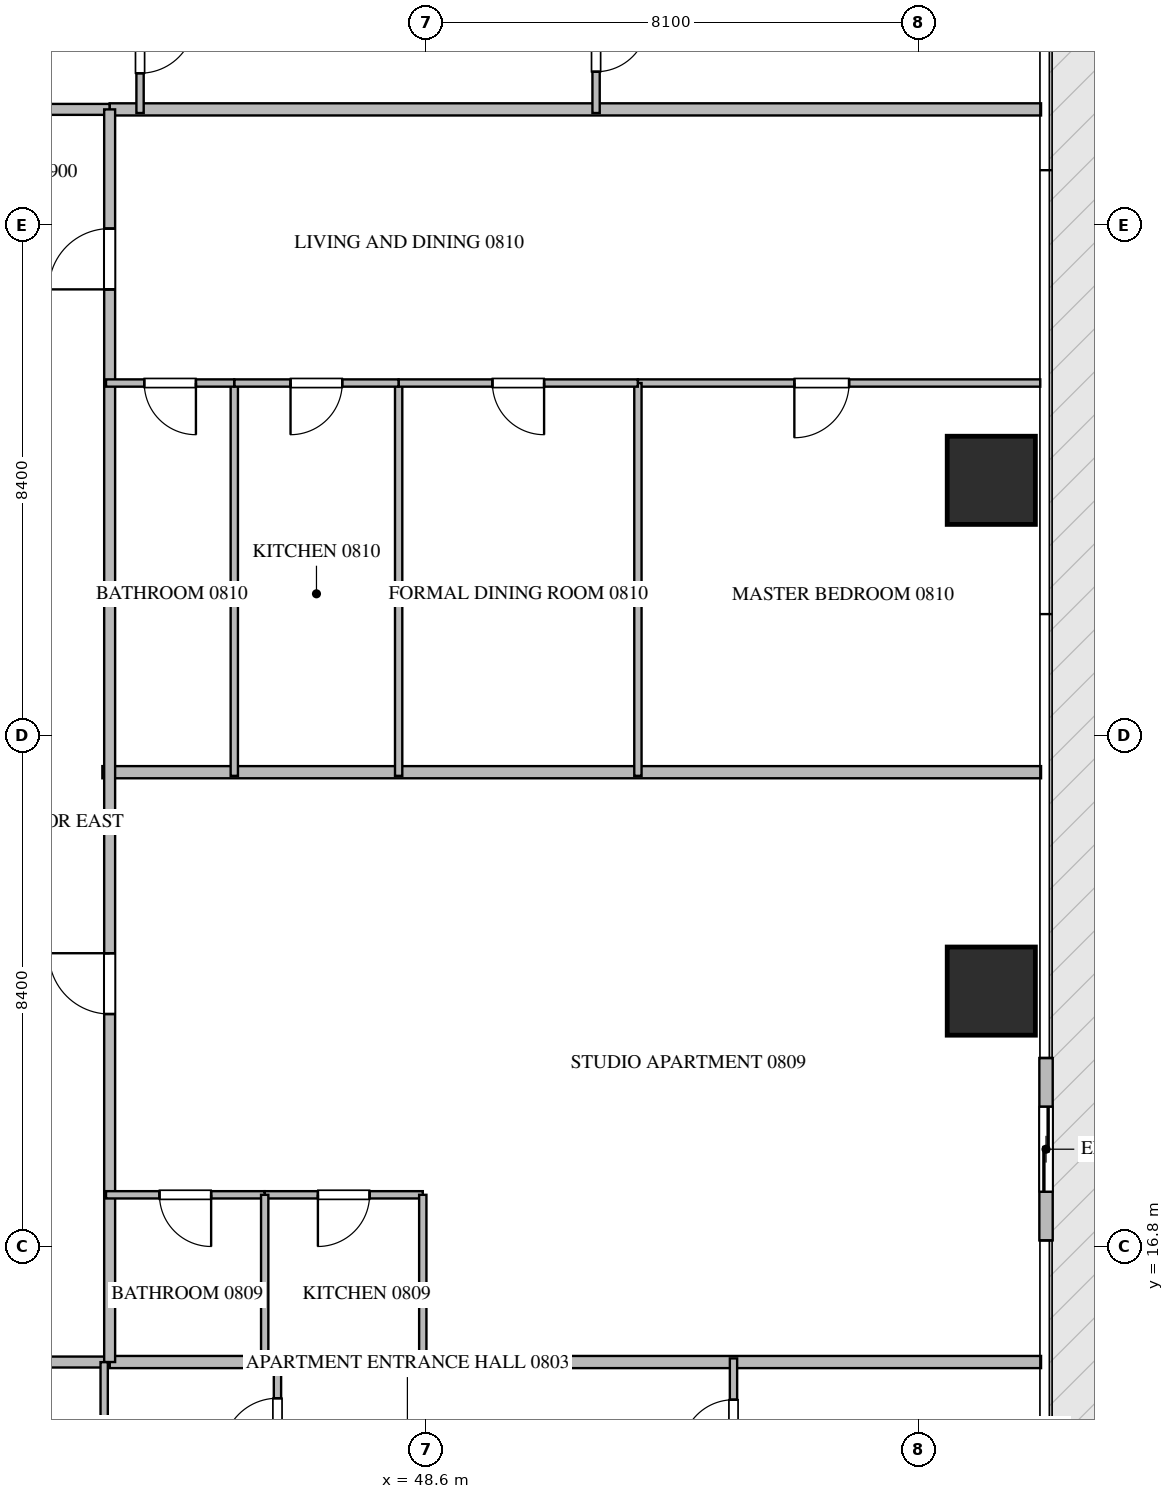
"""IFC4 building model, lengths in metres.
Left out: names, types, materials, properties, quantities, classifications, styles, units other than length and angle.
Written with IfcOpenShell. Run it as: python <this file> out.ifc"""

import sys

from ifc_helpers import new_model, si_unit, direction, frame, frame_2d, origin, origin_2d, place, context, subcontext, project, spatial, rectangle, extrude, source, transform, mapped, element, fill, save


model = new_model("IFC4")
c1 = context("Model", 3, precision=1e-05, world=origin(), true_north=direction((0.0, 1.0)))
c2 = subcontext(c1, "Body", "Model", "MODEL_VIEW")
j1 = project(units=[si_unit("LENGTHUNIT", "METRE"), si_unit("PLANEANGLEUNIT", "RADIAN")], contexts=[c1])
p1 = place(None, origin())
s1 = spatial("IfcSite", under=j1, at=p1, CompositionType="ELEMENT")
p2 = place(p1, origin())
s2 = spatial("IfcBuilding", under=s1, at=p2, CompositionType="ELEMENT")
p3 = place(p2, frame((0.0, 0.0, 37.95)))
s3 = spatial("IfcBuildingStorey", under=s2, at=p3, CompositionType="ELEMENT", Elevation=37.95)
m1 = source(origin(), c2, "Body", "SweptSolid", [
    extrude(rectangle(XDim=1.45, YDim=1.45, at=origin_2d()), origin(), (0.0, 0.0, 1.0), 3.75),
])
for number, where, z_axis, x_axis in (
    (1, (57.9, 21.0, -0.26), (0.0, 0.0, 1.0), (1.0, 0.0, 0.0)),
    (2, (57.9, 29.4, -0.26), (0.0, 0.0, 1.0), (1.0, 0.0, 0.0)),
):
    element("IfcColumn", number, at=place(p3, frame(where, z_axis=z_axis, x_axis=x_axis)), inside=s3, PredefinedType="COLUMN", context=c2, shape_type="MappedRepresentation", body=[
        mapped(m1, transform((0.0, 0.0, 0.0), scale=1.0)),
    ])
p4 = place(p3, frame((58.8, 16.9, 0.0), z_axis=(0.0, 0.0, 1.0), x_axis=(0.0, 1.0, 0.0)))
e3 = element("IfcWall", 3, at=p4, inside=s3, PredefinedType="ELEMENTEDWALL", context=c2, shape_type="SweptSolid", body=[
    extrude(rectangle(XDim=3.0, YDim=0.22, at=frame_2d((1.5, 0.0))), origin(), (0.0, 0.0, 1.0), 3.475),
])
p5 = place(p4, frame((0.8, 0.0, 0.0)))
e4 = element("IfcOpeningElement", 4, at=p5, cuts=e3, PredefinedType="OPENING", context=c2, shape_type="SweptSolid", body=[
    extrude(rectangle(XDim=1.4, YDim=2.25, at=frame_2d((0.7, 1.125))), frame((0.0, 0.12, 0.0), z_axis=(0.0, -1.0, 0.0), x_axis=(1.0, 0.0, 0.0)), (0.0, 0.0, 1.0), 0.24),
])
p6 = place(p3, frame((43.28, 24.6, 0.0), z_axis=(0.0, 0.0, 1.0), x_axis=(1.0, 0.0, 0.0)))
e5 = element("IfcWall", 5, at=p6, inside=s3, PredefinedType="PARTITIONING", context=c2, shape_type="SweptSolid", body=[
    extrude(rectangle(XDim=15.438, YDim=0.2, at=frame_2d((7.719, 0.0))), origin(), (0.0, 0.0, 1.0), 3.49),
])
for number, where, z_axis, x_axis in (
    (6, (43.4, 14.9, 0.0), (0.0, 0.0, 1.0), (1.0, 0.0, 0.0)),
    (7, (43.4, 35.5, 0.0), (0.0, 0.0, 1.0), (1.0, 0.0, 0.0)),
):
    element("IfcWall", number, at=place(p3, frame(where, z_axis=z_axis, x_axis=x_axis)), inside=s3, PredefinedType="PARTITIONING", context=c2, shape_type="SweptSolid", body=[
        extrude(rectangle(XDim=15.318, YDim=0.2, at=frame_2d((7.659, 0.0))), origin(), (0.0, 0.0, 1.0), 3.49),
    ])
p7 = place(p3, frame((21.402, 14.9, 0.0), z_axis=(0.0, 0.0, 1.0), x_axis=(1.0, 0.0, 0.0)))
e8 = element("IfcWall", 8, at=p7, inside=s3, PredefinedType="PARTITIONING", context=c2, shape_type="SweptSolid", body=[
    extrude(rectangle(XDim=21.996, YDim=0.18, at=frame_2d((10.998, 0.0))), origin(), (0.0, 0.0, 1.0), 3.49),
])
p8 = place(p7, frame((2.1, 0.0, 0.0)))
e9 = element("IfcOpeningElement", 9, at=p8, cuts=e8, PredefinedType="OPENING", context=c2, shape_type="SweptSolid", body=[
    extrude(rectangle(XDim=1.0, YDim=2.15, at=frame_2d((0.5, 1.075))), frame((0.0, 0.1, 0.0), z_axis=(0.0, -1.0, 0.0), x_axis=(1.0, 0.0, 0.0)), (0.0, 0.0, 1.0), 0.2),
])
p9 = place(p7, frame((14.109, 0.0, 0.0)))
e10 = element("IfcOpeningElement", 10, at=p9, cuts=e8, PredefinedType="OPENING", context=c2, shape_type="SweptSolid", body=[
    extrude(rectangle(XDim=1.0, YDim=2.15, at=frame_2d((0.5, 1.075))), frame((0.0, 0.1, 0.0), z_axis=(0.0, -1.0, 0.0), x_axis=(1.0, 0.0, 0.0)), (0.0, 0.0, 1.0), 0.2),
])
p10 = place(p7, frame((18.896, 0.0, 0.0)))
e11 = element("IfcOpeningElement", 11, at=p10, cuts=e8, PredefinedType="OPENING", context=c2, shape_type="SweptSolid", body=[
    extrude(rectangle(XDim=1.0, YDim=2.15, at=frame_2d((0.5, 1.075))), frame((0.0, 0.1, 0.0), z_axis=(0.0, -1.0, 0.0), x_axis=(1.0, 0.0, 0.0)), (0.0, 0.0, 1.0), 0.2),
])
p11 = place(p3, frame((21.402, 35.5, 0.0), z_axis=(0.0, 0.0, 1.0), x_axis=(1.0, 0.0, 0.0)))
e12 = element("IfcWall", 12, at=p11, inside=s3, PredefinedType="PARTITIONING", context=c2, shape_type="SweptSolid", body=[
    extrude(rectangle(XDim=21.996, YDim=0.18, at=frame_2d((10.998, 0.0))), origin(), (0.0, 0.0, 1.0), 3.49),
])
p12 = place(p11, frame((2.1, 0.0, 0.0)))
e13 = element("IfcOpeningElement", 13, at=p12, cuts=e12, PredefinedType="OPENING", context=c2, shape_type="SweptSolid", body=[
    extrude(rectangle(XDim=1.0, YDim=2.15, at=frame_2d((0.5, 1.075))), frame((0.0, 0.1, 0.0), z_axis=(0.0, -1.0, 0.0), x_axis=(1.0, 0.0, 0.0)), (0.0, 0.0, 1.0), 0.2),
])
p13 = place(p11, frame((10.498, 0.0, 0.0)))
e14 = element("IfcOpeningElement", 14, at=p13, cuts=e12, PredefinedType="OPENING", context=c2, shape_type="SweptSolid", body=[
    extrude(rectangle(XDim=1.0, YDim=2.15, at=frame_2d((0.5, 1.075))), frame((0.0, 0.1, 0.0), z_axis=(0.0, -1.0, 0.0), x_axis=(1.0, 0.0, 0.0)), (0.0, 0.0, 1.0), 0.2),
])
p14 = place(p11, frame((16.272, 0.0, 0.0)))
e15 = element("IfcOpeningElement", 15, at=p14, cuts=e12, PredefinedType="OPENING", context=c2, shape_type="SweptSolid", body=[
    extrude(rectangle(XDim=1.0, YDim=2.15, at=frame_2d((0.5, 1.075))), frame((0.0, 0.1, 0.0), z_axis=(0.0, -1.0, 0.0), x_axis=(1.0, 0.0, 0.0)), (0.0, 0.0, 1.0), 0.2),
])
p15 = place(p3, frame((43.4, 14.9, 0.0), z_axis=(0.0, 0.0, 1.0), x_axis=(0.0, 1.0, 0.0)))
e16 = element("IfcWall", 16, at=p15, inside=s3, PredefinedType="PARTITIONING", context=c2, shape_type="SweptSolid", body=[
    extrude(rectangle(XDim=20.6, YDim=0.18, at=frame_2d((10.3, 0.0))), origin(), (0.0, 0.0, 1.0), 3.49),
])
p16 = place(p15, frame((5.723, 0.0, 0.0)))
e17 = element("IfcOpeningElement", 17, at=p16, cuts=e16, PredefinedType="OPENING", context=c2, shape_type="SweptSolid", body=[
    extrude(rectangle(XDim=1.0, YDim=2.15, at=frame_2d((0.5, 1.075))), frame((0.0, 0.1, 0.0), z_axis=(0.0, -1.0, 0.0), x_axis=(1.0, 0.0, 0.0)), (0.0, 0.0, 1.0), 0.2),
])
p17 = place(p15, frame((17.64, 0.0, 0.0)))
e18 = element("IfcOpeningElement", 18, at=p17, cuts=e16, PredefinedType="OPENING", context=c2, shape_type="SweptSolid", body=[
    extrude(rectangle(XDim=1.0, YDim=2.15, at=frame_2d((0.5, 1.075))), frame((0.0, 0.1, 0.0), z_axis=(0.0, -1.0, 0.0), x_axis=(1.0, 0.0, 0.0)), (0.0, 0.0, 1.0), 0.2),
])
p18 = place(p3, frame((43.31, 12.15, 0.0), z_axis=(0.0, 0.0, 1.0), x_axis=(0.0, 1.0, 0.0)))
e19 = element("IfcWall", 19, at=p18, inside=s3, PredefinedType="PARTITIONING", context=c2, shape_type="SweptSolid", body=[
    extrude(rectangle(XDim=2.748, YDim=0.12, at=frame_2d((1.374, 0.0))), origin(), (0.0, 0.0, 1.0), 3.49),
])
p19 = place(p3, frame((46.16, 12.75, 0.0), z_axis=(0.0, 0.0, 1.0), x_axis=(0.0, 1.0, 0.0)))
e20 = element("IfcWall", 20, at=p19, inside=s3, PredefinedType="PARTITIONING", context=c2, shape_type="SweptSolid", body=[
    extrude(rectangle(XDim=2.21, YDim=0.12, at=frame_2d((1.105, 0.0))), origin(), (0.0, 0.0, 1.0), 3.49),
])
p20 = place(p19, frame((0.655, 0.0, 0.0)))
e21 = element("IfcOpeningElement", 21, at=p20, cuts=e20, PredefinedType="OPENING", context=c2, shape_type="SweptSolid", body=[
    extrude(rectangle(XDim=0.9, YDim=2.1, at=frame_2d((0.45, 1.05))), frame((0.0, 0.07, 0.0), z_axis=(0.0, -1.0, 0.0), x_axis=(1.0, 0.0, 0.0)), (0.0, 0.0, 1.0), 0.14),
])
p21 = place(p3, frame((53.66, 12.75, 0.0), z_axis=(0.0, 0.0, 1.0), x_axis=(0.0, 1.0, 0.0)))
e22 = element("IfcWall", 22, at=p21, inside=s3, PredefinedType="PARTITIONING", context=c2, shape_type="SweptSolid", body=[
    extrude(rectangle(XDim=2.21, YDim=0.12, at=frame_2d((1.105, 0.0))), origin(), (0.0, 0.0, 1.0), 3.49),
])
p22 = place(p21, frame((0.68, 0.0, 0.0)))
e23 = element("IfcOpeningElement", 23, at=p22, cuts=e22, PredefinedType="OPENING", context=c2, shape_type="SweptSolid", body=[
    extrude(rectangle(XDim=0.85, YDim=2.1, at=frame_2d((0.425, 1.05))), frame((0.0, 0.07, 0.0), z_axis=(0.0, -1.0, 0.0), x_axis=(1.0, 0.0, 0.0)), (0.0, 0.0, 1.0), 0.14),
])
p23 = place(p3, frame((43.9, 37.65, 0.0), z_axis=(0.0, 0.0, 1.0), x_axis=(0.0, -1.0, 0.0)))
e24 = element("IfcWall", 24, at=p23, inside=s3, PredefinedType="PARTITIONING", context=c2, shape_type="SweptSolid", body=[
    extrude(rectangle(XDim=2.21, YDim=0.12, at=frame_2d((1.105, 0.0))), origin(), (0.0, 0.0, 1.0), 3.49),
])
p24 = place(p23, frame((0.655, 0.0, 0.0)))
e25 = element("IfcOpeningElement", 25, at=p24, cuts=e24, PredefinedType="OPENING", context=c2, shape_type="SweptSolid", body=[
    extrude(rectangle(XDim=0.9, YDim=2.1, at=frame_2d((0.45, 1.05))), frame((0.0, 0.07, 0.0), z_axis=(0.0, -1.0, 0.0), x_axis=(1.0, 0.0, 0.0)), (0.0, 0.0, 1.0), 0.14),
])
p25 = place(p3, frame((51.4, 37.648, 0.0), z_axis=(0.0, 0.0, 1.0), x_axis=(0.0, -1.0, 0.0)))
e26 = element("IfcWall", 26, at=p25, inside=s3, PredefinedType="PARTITIONING", context=c2, shape_type="SweptSolid", body=[
    extrude(rectangle(XDim=2.208, YDim=0.12, at=frame_2d((1.104, 0.0))), origin(), (0.0, 0.0, 1.0), 3.49),
])
p26 = place(p25, frame((0.679, 0.0, 0.0)))
e27 = element("IfcOpeningElement", 27, at=p26, cuts=e26, PredefinedType="OPENING", context=c2, shape_type="SweptSolid", body=[
    extrude(rectangle(XDim=0.85, YDim=2.1, at=frame_2d((0.425, 1.05))), frame((0.0, 0.07, 0.0), z_axis=(0.0, -1.0, 0.0), x_axis=(1.0, 0.0, 0.0)), (0.0, 0.0, 1.0), 0.14),
])
p27 = place(p3, frame((48.55, 17.65, 0.0), z_axis=(0.0, 0.0, 1.0), x_axis=(-1.0, 0.0, 0.0)))
e28 = element("IfcWall", 28, at=p27, inside=s3, PredefinedType="PARTITIONING", context=c2, shape_type="SweptSolid", body=[
    extrude(rectangle(XDim=2.6, YDim=0.12, at=frame_2d((1.3, 0.0))), origin(), (0.0, 0.0, 1.0), 3.49),
])
p28 = place(p27, frame((0.875, 0.0, 0.0)))
e29 = element("IfcOpeningElement", 29, at=p28, cuts=e28, PredefinedType="OPENING", context=c2, shape_type="SweptSolid", body=[
    extrude(rectangle(XDim=0.85, YDim=2.1, at=frame_2d((0.425, 1.05))), frame((0.0, 0.07, 0.0), z_axis=(0.0, -1.0, 0.0), x_axis=(1.0, 0.0, 0.0)), (0.0, 0.0, 1.0), 0.14),
])
p29 = place(p3, frame((45.948, 17.65, 0.0), z_axis=(0.0, 0.0, 1.0), x_axis=(-1.0, 0.0, 0.0)))
e30 = element("IfcWall", 30, at=p29, inside=s3, PredefinedType="PARTITIONING", context=c2, shape_type="SweptSolid", body=[
    extrude(rectangle(XDim=2.608, YDim=0.12, at=frame_2d((1.304, 0.0))), origin(), (0.0, 0.0, 1.0), 3.49),
])
p30 = place(p29, frame((0.879, 0.0, 0.0)))
e31 = element("IfcOpeningElement", 31, at=p30, cuts=e30, PredefinedType="OPENING", context=c2, shape_type="SweptSolid", body=[
    extrude(rectangle(XDim=0.85, YDim=2.1, at=frame_2d((0.425, 1.05))), frame((0.0, 0.07, 0.0), z_axis=(0.0, -1.0, 0.0), x_axis=(1.0, 0.0, 0.0)), (0.0, 0.0, 1.0), 0.14),
])
for number, where, z_axis, x_axis in (
    (32, (45.95, 14.84, 0.0), (0.0, 0.0, 1.0), (0.0, 1.0, 0.0)),
    (33, (48.55, 14.84, 0.0), (0.0, 0.0, 1.0), (0.0, 1.0, 0.0)),
):
    element("IfcWall", number, at=place(p3, frame(where, z_axis=z_axis, x_axis=x_axis)), inside=s3, PredefinedType="PARTITIONING", context=c2, shape_type="SweptSolid", body=[
        extrude(rectangle(XDim=2.81, YDim=0.12, at=frame_2d((1.405, 0.0))), origin(), (0.0, 0.0, 1.0), 3.49),
    ])
p31 = place(p3, frame((58.705, 31.0, 0.0), z_axis=(0.0, 0.0, 1.0), x_axis=(-1.0, 0.0, 0.0)))
e34 = element("IfcWall", 34, at=p31, inside=s3, PredefinedType="PARTITIONING", context=c2, shape_type="SweptSolid", body=[
    extrude(rectangle(XDim=6.617, YDim=0.12, at=frame_2d((3.309, 0.0))), origin(), (0.0, 0.0, 1.0), 3.49),
])
p32 = place(p31, frame((3.144, 0.0, 0.0)))
e35 = element("IfcOpeningElement", 35, at=p32, cuts=e34, PredefinedType="OPENING", context=c2, shape_type="SweptSolid", body=[
    extrude(rectangle(XDim=0.9, YDim=2.1, at=frame_2d((0.45, 1.05))), frame((0.0, 0.07, 0.0), z_axis=(0.0, -1.0, 0.0), x_axis=(1.0, 0.0, 0.0)), (0.0, 0.0, 1.0), 0.14),
])
for number, where, z_axis, x_axis in (
    (36, (52.088, 24.54, 0.0), (0.0, 0.0, 1.0), (0.0, 1.0, 0.0)),
    (37, (48.153, 24.54, 0.0), (0.0, 0.0, 1.0), (0.0, 1.0, 0.0)),
    (38, (45.45, 24.54, 0.0), (0.0, 0.0, 1.0), (0.0, 1.0, 0.0)),
):
    element("IfcWall", number, at=place(p3, frame(where, z_axis=z_axis, x_axis=x_axis)), inside=s3, PredefinedType="PARTITIONING", context=c2, shape_type="SweptSolid", body=[
        extrude(rectangle(XDim=6.46, YDim=0.12, at=frame_2d((3.23, 0.0))), origin(), (0.0, 0.0, 1.0), 3.49),
    ])
p33 = place(p3, frame((52.086, 31.0, 0.0), z_axis=(0.0, 0.0, 1.0), x_axis=(-1.0, 0.0, 0.0)))
e39 = element("IfcWall", 39, at=p33, inside=s3, PredefinedType="PARTITIONING", context=c2, shape_type="SweptSolid", body=[
    extrude(rectangle(XDim=3.933, YDim=0.12, at=frame_2d((1.966, 0.0))), origin(), (0.0, 0.0, 1.0), 3.49),
])
p34 = place(p33, frame((1.541, 0.0, 0.0)))
e40 = element("IfcOpeningElement", 40, at=p34, cuts=e39, PredefinedType="OPENING", context=c2, shape_type="SweptSolid", body=[
    extrude(rectangle(XDim=0.85, YDim=2.1, at=frame_2d((0.425, 1.05))), frame((0.0, 0.07, 0.0), z_axis=(0.0, -1.0, 0.0), x_axis=(1.0, 0.0, 0.0)), (0.0, 0.0, 1.0), 0.14),
])
p35 = place(p3, frame((48.151, 31.0, 0.0), z_axis=(0.0, 0.0, 1.0), x_axis=(-1.0, 0.0, 0.0)))
e41 = element("IfcWall", 41, at=p35, inside=s3, PredefinedType="PARTITIONING", context=c2, shape_type="SweptSolid", body=[
    extrude(rectangle(XDim=2.701, YDim=0.12, at=frame_2d((1.351, 0.0))), origin(), (0.0, 0.0, 1.0), 3.49),
])
p36 = place(p35, frame((0.926, 0.0, 0.0)))
e42 = element("IfcOpeningElement", 42, at=p36, cuts=e41, PredefinedType="OPENING", context=c2, shape_type="SweptSolid", body=[
    extrude(rectangle(XDim=0.85, YDim=2.1, at=frame_2d((0.425, 1.05))), frame((0.0, 0.07, 0.0), z_axis=(0.0, -1.0, 0.0), x_axis=(1.0, 0.0, 0.0)), (0.0, 0.0, 1.0), 0.14),
])
p37 = place(p3, frame((45.448, 31.0, 0.0), z_axis=(0.0, 0.0, 1.0), x_axis=(-1.0, 0.0, 0.0)))
e43 = element("IfcWall", 43, at=p37, inside=s3, PredefinedType="PARTITIONING", context=c2, shape_type="SweptSolid", body=[
    extrude(rectangle(XDim=2.108, YDim=0.12, at=frame_2d((1.054, 0.0))), origin(), (0.0, 0.0, 1.0), 3.49),
])
p38 = place(p37, frame((0.629, 0.0, 0.0)))
e44 = element("IfcOpeningElement", 44, at=p38, cuts=e43, PredefinedType="OPENING", context=c2, shape_type="SweptSolid", body=[
    extrude(rectangle(XDim=0.85, YDim=2.1, at=frame_2d((0.425, 1.05))), frame((0.0, 0.07, 0.0), z_axis=(0.0, -1.0, 0.0), x_axis=(1.0, 0.0, 0.0)), (0.0, 0.0, 1.0), 0.14),
])
m2 = source(origin(), c2, "Body", "SweptSolid", [
    extrude(rectangle(XDim=1.4, YDim=2.25, at=frame_2d((0.7, 1.125))), frame((0.0, 0.025, 0.0), z_axis=(0.0, -1.0, 0.0), x_axis=(1.0, 0.0, 0.0)), (0.0, 0.0, 1.0), 0.05),
])
p39 = place(p5, origin())
e45 = element("IfcDoor", 45, at=p39, inside=s3, OperationType="SLIDING_TO_LEFT", PredefinedType="DOOR", context=c2, shape_type="MappedRepresentation", body=[
    mapped(m2, transform((0.0, 0.0, 0.0), scale=1.0)),
])
fill(e4, e45)
m3 = source(origin(), c2, "Body", "SweptSolid", [
    extrude(rectangle(XDim=1.0, YDim=2.15, at=frame_2d((0.5, 1.075))), frame((0.0, 0.025, 0.0), z_axis=(0.0, -1.0, 0.0), x_axis=(1.0, 0.0, 0.0)), (0.0, 0.0, 1.0), 0.05),
])
p40 = place(p16, origin())
e46 = element("IfcDoor", 46, at=p40, inside=s3, OperationType="SINGLE_SWING_RIGHT", PredefinedType="DOOR", context=c2, shape_type="MappedRepresentation", body=[
    mapped(m3, transform((0.0, 0.0, 0.0), scale=1.0)),
])
fill(e17, e46)
p41 = place(p17, origin())
e47 = element("IfcDoor", 47, at=p41, inside=s3, OperationType="SINGLE_SWING_LEFT", PredefinedType="DOOR", context=c2, shape_type="MappedRepresentation", body=[
    mapped(m3, transform((0.0, 0.0, 0.0), scale=1.0)),
])
fill(e18, e47)
m4 = source(origin(), c2, "Body", "SweptSolid", [
    extrude(rectangle(XDim=0.9, YDim=2.1, at=frame_2d((0.45, 1.05))), frame((0.0, 0.025, 0.0), z_axis=(0.0, -1.0, 0.0), x_axis=(1.0, 0.0, 0.0)), (0.0, 0.0, 1.0), 0.05),
])
p42 = place(p20, origin())
e48 = element("IfcDoor", 48, at=p42, inside=s3, OperationType="SINGLE_SWING_LEFT", PredefinedType="DOOR", context=c2, shape_type="MappedRepresentation", body=[
    mapped(m4, transform((0.0, 0.0, 0.0), scale=1.0)),
])
fill(e21, e48)
m5 = source(origin(), c2, "Body", "SweptSolid", [
    extrude(rectangle(XDim=0.85, YDim=2.1, at=frame_2d((0.425, 1.05))), frame((0.0, 0.025, 0.0), z_axis=(0.0, -1.0, 0.0), x_axis=(1.0, 0.0, 0.0)), (0.0, 0.0, 1.0), 0.05),
])
p43 = place(p22, origin())
e49 = element("IfcDoor", 49, at=p43, inside=s3, OperationType="SINGLE_SWING_LEFT", PredefinedType="DOOR", context=c2, shape_type="MappedRepresentation", body=[
    mapped(m5, transform((0.0, 0.0, 0.0), scale=1.0)),
])
fill(e23, e49)
p44 = place(p24, origin())
e50 = element("IfcDoor", 50, at=p44, inside=s3, OperationType="SINGLE_SWING_LEFT", PredefinedType="DOOR", context=c2, shape_type="MappedRepresentation", body=[
    mapped(m4, transform((0.0, 0.0, 0.0), scale=1.0)),
])
fill(e25, e50)
p45 = place(p26, origin())
e51 = element("IfcDoor", 51, at=p45, inside=s3, OperationType="SINGLE_SWING_LEFT", PredefinedType="DOOR", context=c2, shape_type="MappedRepresentation", body=[
    mapped(m5, transform((0.0, 0.0, 0.0), scale=1.0)),
])
fill(e27, e51)
p46 = place(p28, origin())
e52 = element("IfcDoor", 52, at=p46, inside=s3, OperationType="SINGLE_SWING_RIGHT", PredefinedType="DOOR", context=c2, shape_type="MappedRepresentation", body=[
    mapped(m5, transform((0.0, 0.0, 0.0), scale=1.0)),
])
fill(e29, e52)
p47 = place(p30, origin())
e53 = element("IfcDoor", 53, at=p47, inside=s3, OperationType="SINGLE_SWING_LEFT", PredefinedType="DOOR", context=c2, shape_type="MappedRepresentation", body=[
    mapped(m5, transform((0.0, 0.0, 0.0), scale=1.0)),
])
fill(e31, e53)
p48 = place(p32, origin())
e54 = element("IfcDoor", 54, at=p48, inside=s3, OperationType="SINGLE_SWING_RIGHT", PredefinedType="DOOR", context=c2, shape_type="MappedRepresentation", body=[
    mapped(m4, transform((0.0, 0.0, 0.0), scale=1.0)),
])
fill(e35, e54)
p49 = place(p34, origin())
e55 = element("IfcDoor", 55, at=p49, inside=s3, OperationType="SINGLE_SWING_LEFT", PredefinedType="DOOR", context=c2, shape_type="MappedRepresentation", body=[
    mapped(m5, transform((0.0, 0.0, 0.0), scale=1.0)),
])
fill(e40, e55)
p50 = place(p36, origin())
e56 = element("IfcDoor", 56, at=p50, inside=s3, OperationType="SINGLE_SWING_RIGHT", PredefinedType="DOOR", context=c2, shape_type="MappedRepresentation", body=[
    mapped(m5, transform((0.0, 0.0, 0.0), scale=1.0)),
])
fill(e42, e56)
p51 = place(p38, origin())
e57 = element("IfcDoor", 57, at=p51, inside=s3, OperationType="SINGLE_SWING_LEFT", PredefinedType="DOOR", context=c2, shape_type="MappedRepresentation", body=[
    mapped(m5, transform((0.0, 0.0, 0.0), scale=1.0)),
])
fill(e44, e57)
save(model, sys.argv[1])
